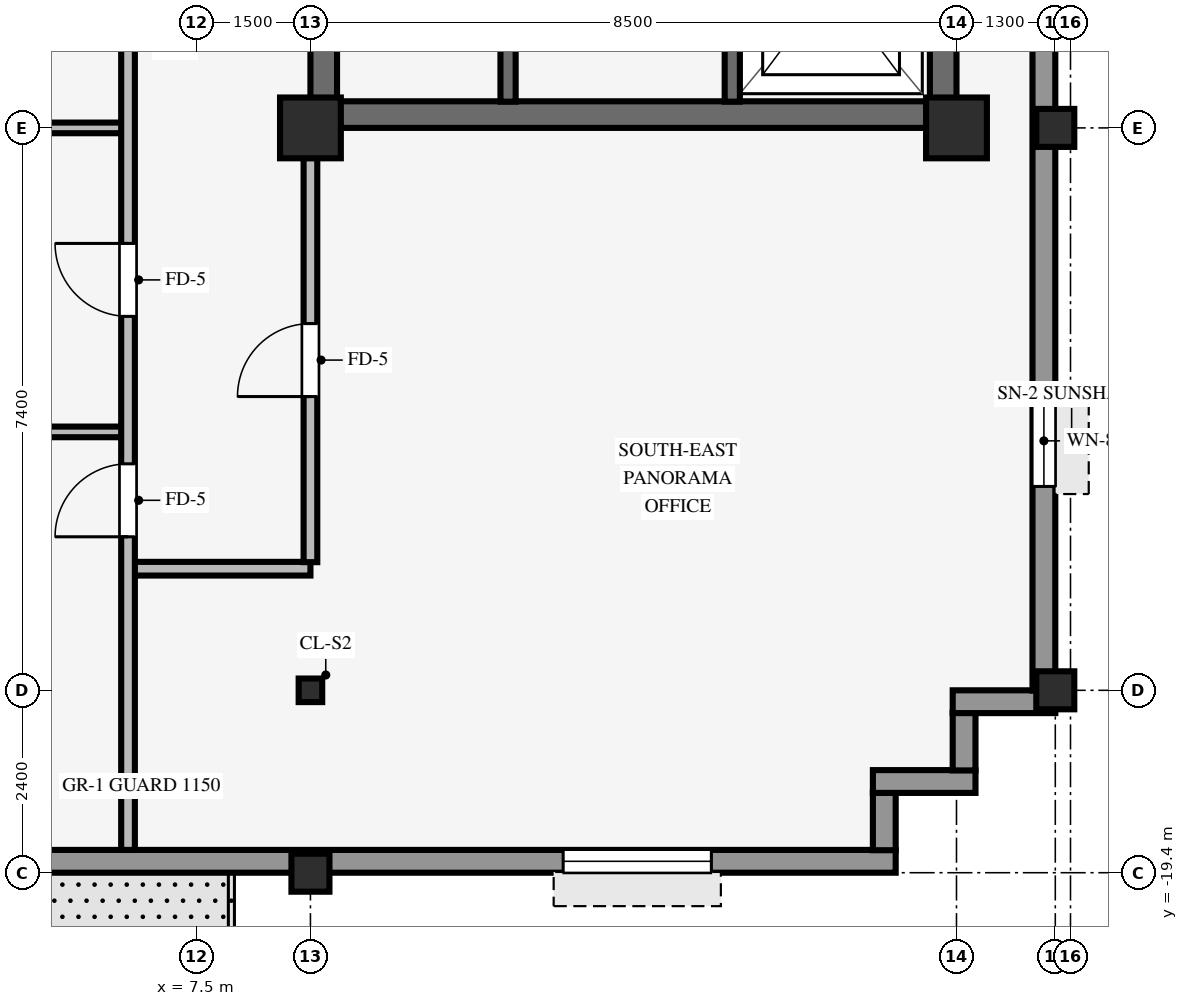
"""IFC4 building model, lengths in metres.
Left out: names, types, materials, properties, quantities, classifications, styles, units other than length and angle.
Written with IfcOpenShell. Run it as: python <this file> out.ifc"""

import sys

from ifc_helpers import new_model, si_unit, direction, frame, frame_2d, origin, origin_2d, place, context, subcontext, project, spatial, rectangle, hollow_rectangle, i_section, extrude, source, transform, mapped, element, fill, save


model = new_model("IFC4")
c1 = context("Model", 3, precision=1e-05, world=origin(), true_north=direction((0.0, 1.0)))
c2 = subcontext(c1, "Body", "Model", "MODEL_VIEW")
j1 = project(units=[si_unit("LENGTHUNIT", "METRE"), si_unit("PLANEANGLEUNIT", "RADIAN")], contexts=[c1])
p1 = place(None, origin())
s1 = spatial("IfcSite", under=j1, at=p1, CompositionType="ELEMENT")
p2 = place(p1, origin())
s2 = spatial("IfcBuilding", under=s1, at=p2, CompositionType="ELEMENT")
p3 = place(p2, frame((0.0, 0.0, 279.85)))
s3 = spatial("IfcBuildingStorey", under=s2, at=p3, CompositionType="ELEMENT", Elevation=279.85)
p4 = place(p3, frame((9.0, -9.425, 0.0), z_axis=(0.0, 0.0, 1.0), x_axis=(1.0, 0.0, 0.0)))
e1 = element("IfcWall", 1, at=p4, inside=s3, PredefinedType="SHEAR", context=c2, shape_type="SweptSolid", body=[
    extrude(rectangle(XDim=8.5, YDim=0.35, at=frame_2d((4.25, 0.0))), origin(), (0.0, 0.0, 1.0), 3.37),
])
p5 = place(p3, frame((9.175, -9.255, 0.0), z_axis=(0.0, 0.0, 1.0), x_axis=(0.0, 1.0, 0.0)))
e2 = element("IfcWall", 2, at=p5, inside=s3, PredefinedType="SHEAR", context=c2, shape_type="SweptSolid", body=[
    extrude(rectangle(XDim=18.51, YDim=0.35, at=frame_2d((9.255, 0.0))), origin(), (0.0, 0.0, 1.0), 3.37),
])
p6 = place(p5, frame((8.655, 0.0, 0.0)))
e3 = element("IfcOpeningElement", 3, at=p6, cuts=e2, PredefinedType="OPENING", context=c2, shape_type="SweptSolid", body=[
    extrude(rectangle(XDim=1.2, YDim=2.15, at=frame_2d((0.6, 1.075))), frame((0.0, 0.185, 0.0), z_axis=(0.0, -1.0, 0.0), x_axis=(1.0, 0.0, 0.0)), (0.0, 0.0, 1.0), 0.37),
])
p7 = place(p3, frame((17.325, -9.255, 0.0), z_axis=(0.0, 0.0, 1.0), x_axis=(0.0, 1.0, 0.0)))
e4 = element("IfcWall", 4, at=p7, inside=s3, PredefinedType="SHEAR", context=c2, shape_type="SweptSolid", body=[
    extrude(rectangle(XDim=18.51, YDim=0.35, at=frame_2d((9.255, 0.0))), origin(), (0.0, 0.0, 1.0), 3.37),
])
for number, where, z_axis, x_axis in (
    (5, (9.0, -9.6, 0.0), (0.0, 0.0, 1.0), (1.0, 0.0, 0.0)),
    (6, (17.5, -9.6, 0.0), (0.0, 0.0, 1.0), (1.0, 0.0, 0.0)),
):
    element("IfcColumn", number, at=place(p3, frame(where, z_axis=z_axis, x_axis=x_axis)), inside=s3, PredefinedType="COLUMN", context=c2, shape_type="SweptSolid", body=[
        extrude(rectangle(XDim=0.8, YDim=0.8, at=origin_2d()), origin(), (0.0, 0.0, 1.0), 3.37),
    ])
for number, where, z_axis, x_axis in (
    (7, (18.8, -17.0, 0.0), (0.0, 0.0, 1.0), (1.0, 0.0, 0.0)),
    (8, (18.8, -9.6, 0.0), (0.0, 0.0, 1.0), (1.0, 0.0, 0.0)),
    (9, (9.0, -19.4, 0.0), (0.0, 0.0, 1.0), (1.0, 0.0, 0.0)),
):
    element("IfcColumn", number, at=place(p3, frame(where, z_axis=z_axis, x_axis=x_axis)), inside=s3, PredefinedType="COLUMN", context=c2, shape_type="SweptSolid", body=[
        extrude(hollow_rectangle(XDim=0.5, YDim=0.5, WallThickness=0.032, InnerFilletRadius=0.032, OuterFilletRadius=0.064, at=origin_2d()), origin(), (0.0, 0.0, 1.0), 3.37),
    ])
p8 = place(p3, frame((9.0, -17.0, 0.0), z_axis=(0.0, 0.0, 1.0), x_axis=(1.0, 0.0, 0.0)))
e10 = element("IfcColumn", 10, at=p8, inside=s3, PredefinedType="COLUMN", context=c2, shape_type="SweptSolid", body=[
    extrude(i_section(OverallWidth=0.31, OverallDepth=0.31, WebThickness=0.015, FlangeThickness=0.015, FilletRadius=0.015, at=origin_2d()), origin(), (0.0, 0.0, 1.0), 3.37),
])
p9 = place(p3, frame((-18.9, -19.25, 0.0), z_axis=(0.0, 0.0, 1.0), x_axis=(1.0, 0.0, 0.0)))
e11 = element("IfcWall", 11, at=p9, inside=s3, PredefinedType="STANDARD", context=c2, shape_type="SweptSolid", body=[
    extrude(rectangle(XDim=35.6, YDim=0.3, at=frame_2d((17.8, 0.0))), origin(), (0.0, 0.0, 1.0), 2.705),
])
p10 = place(p9, frame((24.15, 0.0, 0.0), z_axis=(0.0, 0.0, 1.0), x_axis=(-1.0, 0.0, 0.0)))
e12 = element("IfcOpeningElement", 12, at=p10, cuts=e11, PredefinedType="OPENING", context=c2, shape_type="SweptSolid", body=[
    extrude(rectangle(XDim=1.05, YDim=2.1, at=frame_2d((0.525, 1.05))), frame((0.0, 0.16, 0.0), z_axis=(0.0, -1.0, 0.0), x_axis=(1.0, 0.0, 0.0)), (0.0, 0.0, 1.0), 0.32),
])
p11 = place(p9, frame((1.075, 0.0, 0.8)))
e13 = element("IfcOpeningElement", 13, at=p11, cuts=e11, PredefinedType="OPENING", context=c2, shape_type="SweptSolid", body=[
    extrude(rectangle(XDim=1.95, YDim=1.48, at=frame_2d((0.975, 0.74))), frame((0.0, 0.16, 0.0), z_axis=(0.0, -1.0, 0.0), x_axis=(1.0, 0.0, 0.0)), (0.0, 0.0, 1.0), 0.32),
])
p12 = place(p9, frame((7.225, 0.0, 0.8)))
e14 = element("IfcOpeningElement", 14, at=p12, cuts=e11, PredefinedType="OPENING", context=c2, shape_type="SweptSolid", body=[
    extrude(rectangle(XDim=1.95, YDim=1.48, at=frame_2d((0.975, 0.74))), frame((0.0, 0.16, 0.0), z_axis=(0.0, -1.0, 0.0), x_axis=(1.0, 0.0, 0.0)), (0.0, 0.0, 1.0), 0.32),
])
p13 = place(p9, frame((12.925, 0.0, 0.8)))
e15 = element("IfcOpeningElement", 15, at=p13, cuts=e11, PredefinedType="OPENING", context=c2, shape_type="SweptSolid", body=[
    extrude(rectangle(XDim=1.95, YDim=1.48, at=frame_2d((0.975, 0.74))), frame((0.0, 0.16, 0.0), z_axis=(0.0, -1.0, 0.0), x_axis=(1.0, 0.0, 0.0)), (0.0, 0.0, 1.0), 0.32),
])
p14 = place(p9, frame((15.475, 0.0, 0.8)))
e16 = element("IfcOpeningElement", 16, at=p14, cuts=e11, PredefinedType="OPENING", context=c2, shape_type="SweptSolid", body=[
    extrude(rectangle(XDim=1.95, YDim=1.48, at=frame_2d((0.975, 0.74))), frame((0.0, 0.16, 0.0), z_axis=(0.0, -1.0, 0.0), x_axis=(1.0, 0.0, 0.0)), (0.0, 0.0, 1.0), 0.32),
])
p15 = place(p9, frame((20.725, 0.0, 0.8)))
e17 = element("IfcOpeningElement", 17, at=p15, cuts=e11, PredefinedType="OPENING", context=c2, shape_type="SweptSolid", body=[
    extrude(rectangle(XDim=1.95, YDim=1.48, at=frame_2d((0.975, 0.74))), frame((0.0, 0.16, 0.0), z_axis=(0.0, -1.0, 0.0), x_axis=(1.0, 0.0, 0.0)), (0.0, 0.0, 1.0), 0.32),
])
p16 = place(p9, frame((31.225, 0.0, 0.8)))
e18 = element("IfcOpeningElement", 18, at=p16, cuts=e11, PredefinedType="OPENING", context=c2, shape_type="SweptSolid", body=[
    extrude(rectangle(XDim=1.95, YDim=1.48, at=frame_2d((0.975, 0.74))), frame((0.0, 0.16, 0.0), z_axis=(0.0, -1.0, 0.0), x_axis=(1.0, 0.0, 0.0)), (0.0, 0.0, 1.0), 0.32),
])
p17 = place(p3, frame((16.55, -19.104, 0.0), z_axis=(0.0, 0.0, 1.0), x_axis=(0.0, 1.0, 0.0)))
e19 = element("IfcWall", 19, at=p17, inside=s3, PredefinedType="STANDARD", context=c2, shape_type="SweptSolid", body=[
    extrude(rectangle(XDim=0.758, YDim=0.3, at=frame_2d((0.379, 0.0))), origin(), (0.0, 0.0, 1.0), 2.892),
])
p18 = place(p3, frame((16.4, -18.2, 0.0), z_axis=(0.0, 0.0, 1.0), x_axis=(1.0, 0.0, 0.0)))
e20 = element("IfcWall", 20, at=p18, inside=s3, PredefinedType="STANDARD", context=c2, shape_type="SweptSolid", body=[
    extrude(rectangle(XDim=1.35, YDim=0.3, at=frame_2d((0.675, 0.0))), origin(), (0.0, 0.0, 1.0), 2.892),
])
p19 = place(p3, frame((17.6, -18.054, 0.0), z_axis=(0.0, 0.0, 1.0), x_axis=(0.0, 1.0, 0.0)))
e21 = element("IfcWall", 21, at=p19, inside=s3, PredefinedType="STANDARD", context=c2, shape_type="SweptSolid", body=[
    extrude(rectangle(XDim=0.758, YDim=0.3, at=frame_2d((0.379, 0.0))), origin(), (0.0, 0.0, 1.0), 2.892),
])
p20 = place(p3, frame((17.45, -17.15, 0.0), z_axis=(0.0, 0.0, 1.0), x_axis=(1.0, 0.0, 0.0)))
e22 = element("IfcWall", 22, at=p20, inside=s3, PredefinedType="STANDARD", context=c2, shape_type="SweptSolid", body=[
    extrude(rectangle(XDim=1.35, YDim=0.3, at=frame_2d((0.675, 0.0))), origin(), (0.0, 0.0, 1.0), 2.892),
])
p21 = place(p3, frame((18.65, -17.004, 0.0), z_axis=(0.0, 0.0, 1.0), x_axis=(0.0, 1.0, 0.0)))
e23 = element("IfcWall", 23, at=p21, inside=s3, PredefinedType="STANDARD", context=c2, shape_type="SweptSolid", body=[
    extrude(rectangle(XDim=34.008, YDim=0.3, at=frame_2d((17.004, 0.0))), origin(), (0.0, 0.0, 1.0), 2.705),
])
p22 = place(p21, frame((2.686, 0.0, 0.8)))
e24 = element("IfcOpeningElement", 24, at=p22, cuts=e23, PredefinedType="OPENING", context=c2, shape_type="SweptSolid", body=[
    extrude(rectangle(XDim=1.2, YDim=1.48, at=frame_2d((0.6, 0.74))), frame((0.0, 0.16, 0.0), z_axis=(0.0, -1.0, 0.0), x_axis=(1.0, 0.0, 0.0)), (0.0, 0.0, 1.0), 0.32),
])
p23 = place(p21, frame((30.122, 0.0, 0.8)))
e25 = element("IfcOpeningElement", 25, at=p23, cuts=e23, PredefinedType="OPENING", context=c2, shape_type="SweptSolid", body=[
    extrude(rectangle(XDim=1.2, YDim=1.48, at=frame_2d((0.6, 0.74))), frame((0.0, 0.16, 0.0), z_axis=(0.0, -1.0, 0.0), x_axis=(1.0, 0.0, 0.0)), (0.0, 0.0, 1.0), 0.32),
])
p24 = place(p3, frame((14.55, -9.255, 0.0), z_axis=(0.0, 0.0, 1.0), x_axis=(0.0, 1.0, 0.0)))
e26 = element("IfcWall", 26, at=p24, inside=s3, PredefinedType="SHEAR", context=c2, shape_type="SweptSolid", body=[
    extrude(rectangle(XDim=10.16, YDim=0.2, at=frame_2d((5.08, 0.0))), origin(), (0.0, 0.0, 1.0), 3.37),
])
p25 = place(p24, frame((6.615, 0.0, 0.0)))
e27 = element("IfcOpeningElement", 27, at=p25, cuts=e26, PredefinedType="OPENING", context=c2, shape_type="SweptSolid", body=[
    extrude(rectangle(XDim=0.88, YDim=2.1, at=frame_2d((0.44, 1.05))), frame((0.0, 0.11, 0.0), z_axis=(0.0, -1.0, 0.0), x_axis=(1.0, 0.0, 0.0)), (0.0, 0.0, 1.0), 0.22),
])
p26 = place(p24, frame((0.98, 0.0, 0.0)))
e28 = element("IfcOpeningElement", 28, at=p26, cuts=e26, PredefinedType="OPENING", context=c2, shape_type="SweptSolid", body=[
    extrude(rectangle(XDim=1.15, YDim=2.15, at=frame_2d((0.575, 1.075))), frame((0.0, 0.11, 0.0), z_axis=(0.0, -1.0, 0.0), x_axis=(1.0, 0.0, 0.0)), (0.0, 0.0, 1.0), 0.22),
])
p27 = place(p3, frame((11.6, -9.255, 0.0), z_axis=(0.0, 0.0, 1.0), x_axis=(0.0, 1.0, 0.0)))
e29 = element("IfcWall", 29, at=p27, inside=s3, PredefinedType="SHEAR", context=c2, shape_type="SweptSolid", body=[
    extrude(rectangle(XDim=8.025, YDim=0.2, at=frame_2d((4.012, 0.0))), origin(), (0.0, 0.0, 1.0), 3.37),
])
p28 = place(p27, frame((5.615, 0.0, 0.0)))
e30 = element("IfcOpeningElement", 30, at=p28, cuts=e29, PredefinedType="OPENING", context=c2, shape_type="SweptSolid", body=[
    extrude(rectangle(XDim=0.88, YDim=2.1, at=frame_2d((0.44, 1.05))), frame((0.0, 0.11, 0.0), z_axis=(0.0, -1.0, 0.0), x_axis=(1.0, 0.0, 0.0)), (0.0, 0.0, 1.0), 0.22),
])
p29 = place(p3, frame((6.666, -15.4, 0.0), z_axis=(0.0, 0.0, 1.0), x_axis=(1.0, 0.0, 0.0)))
e31 = element("IfcWall", 31, at=p29, inside=s3, PredefinedType="PARTITIONING", context=c2, shape_type="SweptSolid", body=[
    extrude(rectangle(XDim=2.334, YDim=0.18, at=frame_2d((1.167, 0.0))), origin(), (0.0, 0.0, 1.0), 3.36),
])
p30 = place(p3, frame((-6.524, -13.6, 0.0), z_axis=(0.0, 0.0, 1.0), x_axis=(1.0, 0.0, 0.0)))
e32 = element("IfcWall", 32, at=p30, inside=s3, PredefinedType="PARTITIONING", context=c2, shape_type="SweptSolid", body=[
    extrude(rectangle(XDim=13.058, YDim=0.14, at=frame_2d((6.529, 0.0))), origin(), (0.0, 0.0, 1.0), 3.038),
])
p31 = place(p3, frame((0.151, -9.6, 0.0), z_axis=(0.0, 0.0, 1.0), x_axis=(1.0, 0.0, 0.0)))
e33 = element("IfcWall", 33, at=p31, inside=s3, PredefinedType="PARTITIONING", context=c2, shape_type="SweptSolid", body=[
    extrude(rectangle(XDim=6.383, YDim=0.14, at=frame_2d((3.191, 0.0))), origin(), (0.0, 0.0, 1.0), 2.405),
])
p32 = place(p3, frame((6.6, -19.1, 0.0), z_axis=(0.0, 0.0, 1.0), x_axis=(0.0, 1.0, 0.0)))
e34 = element("IfcWall", 34, at=p32, inside=s3, PredefinedType="PARTITIONING", context=c2, shape_type="SweptSolid", body=[
    extrude(rectangle(XDim=17.764, YDim=0.18, at=frame_2d((8.882, 0.0))), origin(), (0.0, 0.0, 1.0), 3.36),
])
p33 = place(p32, frame((13.152, 0.0, 0.0)))
e35 = element("IfcOpeningElement", 35, at=p33, cuts=e34, PredefinedType="OPENING", context=c2, shape_type="SweptSolid", body=[
    extrude(rectangle(XDim=0.96, YDim=2.1, at=frame_2d((0.48, 1.05))), frame((0.0, 0.1, 0.0), z_axis=(0.0, -1.0, 0.0), x_axis=(1.0, 0.0, 0.0)), (0.0, 0.0, 1.0), 0.2),
])
p34 = place(p32, frame((7.02, 0.0, 0.0)))
e36 = element("IfcOpeningElement", 36, at=p34, cuts=e34, PredefinedType="OPENING", context=c2, shape_type="SweptSolid", body=[
    extrude(rectangle(XDim=0.96, YDim=2.1, at=frame_2d((0.48, 1.05))), frame((0.0, 0.1, 0.0), z_axis=(0.0, -1.0, 0.0), x_axis=(1.0, 0.0, 0.0)), (0.0, 0.0, 1.0), 0.2),
])
p35 = place(p32, frame((4.12, 0.0, 0.0)))
e37 = element("IfcOpeningElement", 37, at=p35, cuts=e34, PredefinedType="OPENING", context=c2, shape_type="SweptSolid", body=[
    extrude(rectangle(XDim=0.96, YDim=2.1, at=frame_2d((0.48, 1.05))), frame((0.0, 0.1, 0.0), z_axis=(0.0, -1.0, 0.0), x_axis=(1.0, 0.0, 0.0)), (0.0, 0.0, 1.0), 0.2),
])
p36 = place(p3, frame((9.0, -15.314, 0.0), z_axis=(0.0, 0.0, 1.0), x_axis=(0.0, 1.0, 0.0)))
e38 = element("IfcWall", 38, at=p36, inside=s3, PredefinedType="PARTITIONING", context=c2, shape_type="SweptSolid", body=[
    extrude(rectangle(XDim=5.318, YDim=0.18, at=frame_2d((2.659, 0.0))), origin(), (0.0, 0.0, 1.0), 2.892),
])
p37 = place(p36, frame((2.179, 0.0, 0.0)))
e39 = element("IfcOpeningElement", 39, at=p37, cuts=e38, PredefinedType="OPENING", context=c2, shape_type="SweptSolid", body=[
    extrude(rectangle(XDim=0.96, YDim=2.1, at=frame_2d((0.48, 1.05))), frame((0.0, 0.1, 0.0), z_axis=(0.0, -1.0, 0.0), x_axis=(1.0, 0.0, 0.0)), (0.0, 0.0, 1.0), 0.2),
])
m1 = source(origin(), c2, "Body", "SweptSolid", [
    extrude(rectangle(XDim=1.95, YDim=1.48, at=frame_2d((0.975, 0.74))), frame((0.0, 0.03, 0.0), z_axis=(0.0, -1.0, 0.0), x_axis=(1.0, 0.0, 0.0)), (0.0, 0.0, 1.0), 0.06),
])
p38 = place(p16, origin())
e40 = element("IfcWindow", 40, at=p38, inside=s3, PartitioningType="SINGLE_PANEL", PredefinedType="WINDOW", context=c2, shape_type="MappedRepresentation", body=[
    mapped(m1, transform((0.0, 0.0, 0.0), scale=1.0)),
])
fill(e18, e40)
m2 = source(origin(), c2, "Body", "SweptSolid", [
    extrude(rectangle(XDim=1.2, YDim=1.48, at=frame_2d((0.6, 0.74))), frame((0.0, 0.03, 0.0), z_axis=(0.0, -1.0, 0.0), x_axis=(1.0, 0.0, 0.0)), (0.0, 0.0, 1.0), 0.06),
])
p39 = place(p22, origin())
e41 = element("IfcWindow", 41, at=p39, inside=s3, PartitioningType="SINGLE_PANEL", PredefinedType="WINDOW", context=c2, shape_type="MappedRepresentation", body=[
    mapped(m2, transform((0.0, 0.0, 0.0), scale=1.0)),
])
fill(e24, e41)
m3 = source(origin(), c2, "Body", "SweptSolid", [
    extrude(rectangle(XDim=0.96, YDim=2.1, at=frame_2d((0.48, 1.05))), frame((0.0, 0.025, 0.0), z_axis=(0.0, -1.0, 0.0), x_axis=(1.0, 0.0, 0.0)), (0.0, 0.0, 1.0), 0.05),
])
p40 = place(p37, origin())
e42 = element("IfcDoor", 42, at=p40, inside=s3, OperationType="SINGLE_SWING_LEFT", PredefinedType="DOOR", context=c2, shape_type="MappedRepresentation", body=[
    mapped(m3, transform((0.0, 0.0, 0.0), scale=1.0)),
])
fill(e39, e42)
p41 = place(p34, origin())
e43 = element("IfcDoor", 43, at=p41, inside=s3, OperationType="SINGLE_SWING_RIGHT", PredefinedType="DOOR", context=c2, shape_type="MappedRepresentation", body=[
    mapped(m3, transform((0.0, 0.0, 0.0), scale=1.0)),
])
fill(e36, e43)
p42 = place(p35, origin())
e44 = element("IfcDoor", 44, at=p42, inside=s3, OperationType="SINGLE_SWING_LEFT", PredefinedType="DOOR", context=c2, shape_type="MappedRepresentation", body=[
    mapped(m3, transform((0.0, 0.0, 0.0), scale=1.0)),
])
fill(e37, e44)
save(model, sys.argv[1])
